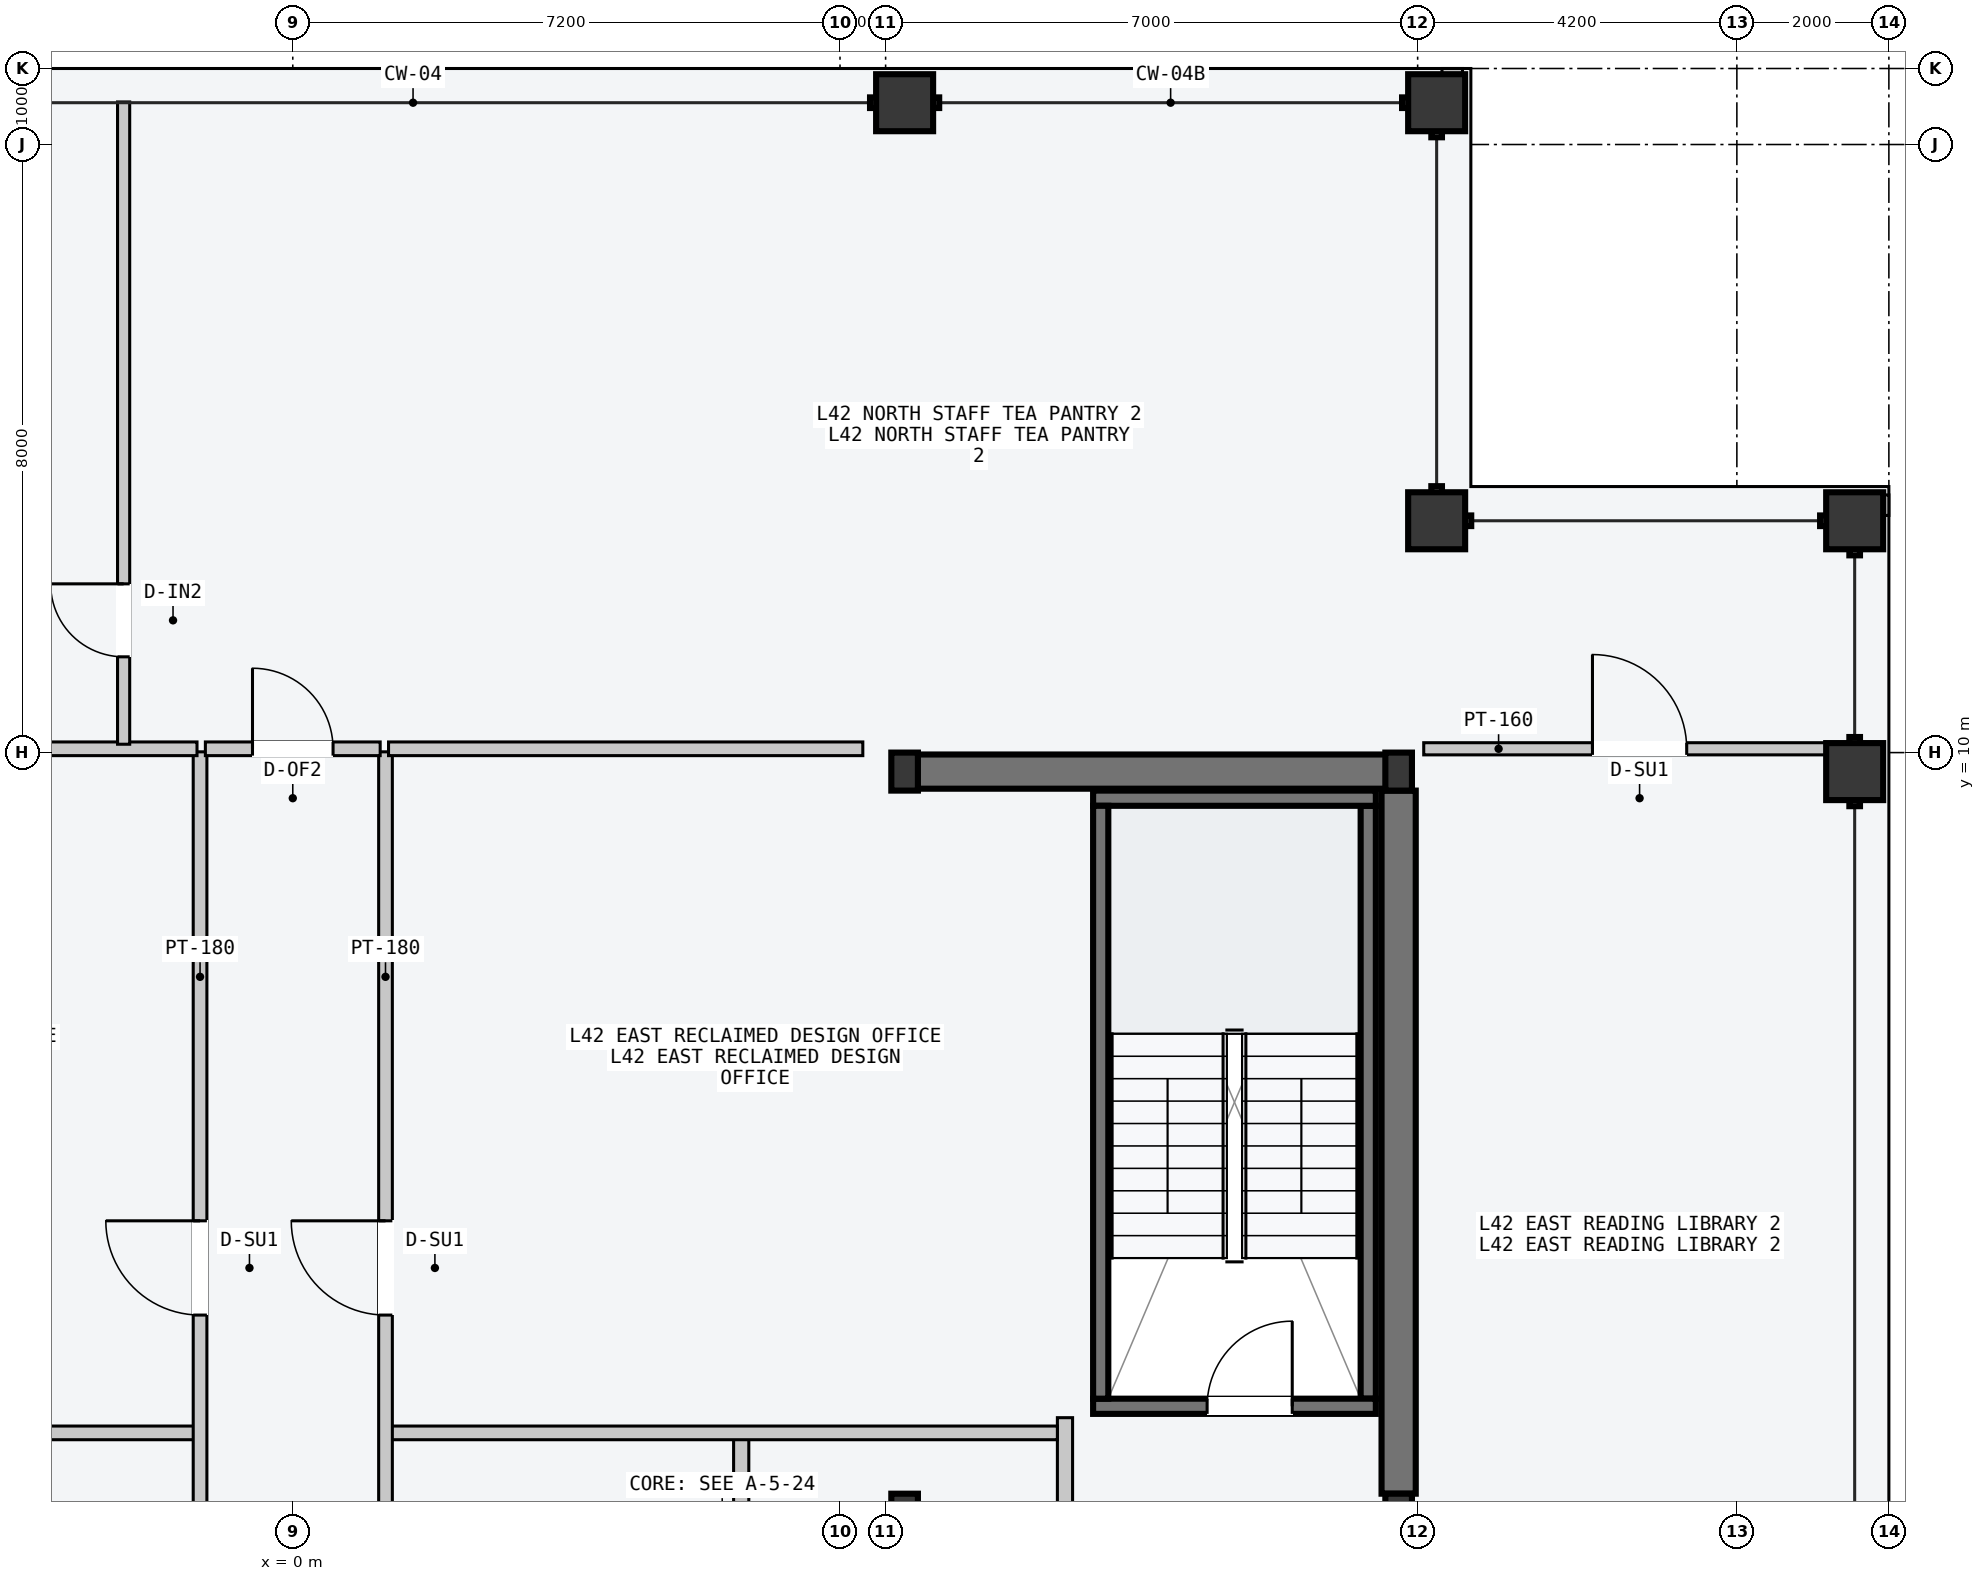
"""IFC4 building model, lengths in metres.
Left out: names, types, materials, properties, quantities, classifications, styles, units other than length and angle.
Written with IfcOpenShell. Run it as: python <this file> out.ifc"""

import sys

from ifc_helpers import new_model, si_unit, direction, frame, frame_2d, origin, origin_2d, place, context, subcontext, project, spatial, rectangle, hollow_rectangle, i_section, extrude, element, fill, save


model = new_model("IFC4")
c1 = context("Model", 3, precision=1e-05, world=origin(), true_north=direction((0.0, 1.0)))
c2 = subcontext(c1, "Body", "Model", "MODEL_VIEW")
j1 = project(units=[si_unit("LENGTHUNIT", "METRE"), si_unit("PLANEANGLEUNIT", "RADIAN")], contexts=[c1])
p1 = place(None, origin())
s1 = spatial("IfcSite", under=j1, at=p1, CompositionType="ELEMENT")
p2 = place(p1, origin())
s2 = spatial("IfcBuilding", under=s1, at=p2, CompositionType="ELEMENT")
p3 = place(p2, frame((0.0, 0.0, 162.3)))
s3 = spatial("IfcBuildingStorey", under=s2, at=p3, CompositionType="ELEMENT", Elevation=162.3)
p4 = place(p3, frame((8.07, 9.75, -0.2), z_axis=(0.0, 0.0, 1.0), x_axis=(1.0, 0.0, 0.0)))
e1 = element("IfcWall", 1, at=p4, inside=s3, PredefinedType="SHEAR", context=c2, shape_type="SweptSolid", body=[
    extrude(rectangle(XDim=6.46, YDim=0.45, at=frame_2d((3.23, 0.0))), origin(), (0.0, 0.0, 1.0), 3.6),
])
p5 = place(p3, frame((14.55, 0.25, -0.2), z_axis=(0.0, 0.0, 1.0), x_axis=(0.0, 1.0, 0.0)))
e2 = element("IfcWall", 2, at=p5, inside=s3, PredefinedType="SHEAR", context=c2, shape_type="SweptSolid", body=[
    extrude(rectangle(XDim=9.25, YDim=0.45, at=frame_2d((4.625, 0.0))), origin(), (0.0, 0.0, 1.0), 3.6),
])
p6 = place(p3, frame((14.15, 1.5, -0.2), z_axis=(0.0, 0.0, 1.0), x_axis=(0.0, 1.0, 0.0)))
e3 = element("IfcWall", 3, at=p6, inside=s3, PredefinedType="SOLIDWALL", context=c2, shape_type="SweptSolid", body=[
    extrude(rectangle(XDim=7.8, YDim=0.2, at=frame_2d((3.9, 0.0))), origin(), (0.0, 0.0, 1.0), 3.6),
])
p7 = place(p3, frame((10.53, 1.4, -0.2), z_axis=(0.0, 0.0, 1.0), x_axis=(1.0, 0.0, 0.0)))
e4 = element("IfcWall", 4, at=p7, inside=s3, PredefinedType="SOLIDWALL", context=c2, shape_type="SweptSolid", body=[
    extrude(rectangle(XDim=3.72, YDim=0.2, at=frame_2d((1.86, 0.0))), origin(), (0.0, 0.0, 1.0), 3.6),
])
p8 = place(p7, frame((1.5, 0.0, 0.2)))
e5 = element("IfcOpeningElement", 5, at=p8, cuts=e4, PredefinedType="OPENING", context=c2, shape_type="SweptSolid", body=[
    extrude(rectangle(XDim=1.12, YDim=2.18, at=frame_2d((0.56, 1.09))), frame((0.0, 0.11, 0.0), z_axis=(0.0, -1.0, 0.0), x_axis=(1.0, 0.0, 0.0)), (0.0, 0.0, 1.0), 0.22),
])
p9 = place(p3, frame((10.53, 9.4, -0.2), z_axis=(0.0, 0.0, 1.0), x_axis=(1.0, 0.0, 0.0)))
e6 = element("IfcWall", 6, at=p9, inside=s3, PredefinedType="SOLIDWALL", context=c2, shape_type="SweptSolid", body=[
    extrude(rectangle(XDim=3.72, YDim=0.2, at=frame_2d((1.86, 0.0))), origin(), (0.0, 0.0, 1.0), 3.6),
])
p10 = place(p3, frame((10.63, 1.5, -0.2), z_axis=(0.0, 0.0, 1.0), x_axis=(0.0, 1.0, 0.0)))
e7 = element("IfcWall", 7, at=p10, inside=s3, PredefinedType="SOLIDWALL", context=c2, shape_type="SweptSolid", body=[
    extrude(rectangle(XDim=7.8, YDim=0.2, at=frame_2d((3.9, 0.0))), origin(), (0.0, 0.0, 1.0), 3.6),
])
for number, where, z_axis, x_axis in (
    (8, (8.05, 0.0, 0.0), (0.0, 0.0, 1.0), (1.0, 0.0, 0.0)),
    (9, (8.05, 9.75, 0.0), (0.0, 0.0, 1.0), (1.0, 0.0, 0.0)),
    (10, (14.55, 0.0, 0.0), (0.0, 0.0, 1.0), (1.0, 0.0, 0.0)),
    (11, (14.55, 9.75, 0.0), (0.0, 0.0, 1.0), (1.0, 0.0, 0.0)),
):
    element("IfcColumn", number, at=place(p3, frame(where, z_axis=z_axis, x_axis=x_axis)), inside=s3, PredefinedType="COLUMN", context=c2, shape_type="SweptSolid", body=[
        extrude(i_section(OverallWidth=0.35, OverallDepth=0.5, WebThickness=0.02, FlangeThickness=0.032, at=origin_2d()), origin(), (0.0, 0.0, 1.0), 3.6),
    ])
for number, where, z_axis, x_axis in (
    (12, (8.05, 18.55, 0.0), (0.0, 0.0, 1.0), (1.0, 0.0, 0.0)),
    (13, (15.05, 18.55, 0.0), (0.0, 0.0, 1.0), (1.0, 0.0, 0.0)),
    (14, (20.55, 9.75, 0.0), (0.0, 0.0, 1.0), (0.0, 1.0, 0.0)),
    (15, (20.55, 13.05, 0.0), (0.0, 0.0, 1.0), (0.0, 1.0, 0.0)),
    (16, (15.05, 13.05, 0.0), (0.0, 0.0, 1.0), (1.0, 0.0, 0.0)),
):
    element("IfcColumn", number, at=place(p3, frame(where, z_axis=z_axis, x_axis=x_axis)), inside=s3, PredefinedType="COLUMN", context=c2, shape_type="SweptSolid", body=[
        extrude(hollow_rectangle(XDim=0.75, YDim=0.75, WallThickness=0.032, at=origin_2d()), origin(), (0.0, 0.0, 1.0), 3.6),
    ])
for number, where, z_axis, x_axis in (
    (17, (15.12, 18.89, 0.0), (0.0, 0.0, 1.0), (1.0, 0.0, 0.0)),
    (18, (20.89, 13.12, 0.0), (0.0, 0.0, 1.0), (0.0, 1.0, 0.0)),
):
    element("IfcWall", number, at=place(p3, frame(where, z_axis=z_axis, x_axis=x_axis)), inside=s3, PredefinedType="PARAPET", context=c2, shape_type="SweptSolid", body=[
        extrude(rectangle(XDim=0.27, YDim=0.22, at=frame_2d((0.135, 0.0))), origin(), (0.0, 0.0, 1.0), 1.2),
    ])
p11 = place(p3, frame((5.9, -9.45, 0.0), z_axis=(0.0, 0.0, 1.0), x_axis=(0.0, 1.0, 0.0)))
e19 = element("IfcWall", 19, at=p11, inside=s3, PredefinedType="PARTITIONING", context=c2, shape_type="SweptSolid", body=[
    extrude(rectangle(XDim=10.5, YDim=0.2, at=frame_2d((5.25, 0.0))), origin(), (0.0, 0.0, 1.0), 3.4),
])
p12 = place(p11, frame((3.9, 0.0, 0.0)))
e20 = element("IfcOpeningElement", 20, at=p12, cuts=e19, PredefinedType="OPENING", context=c2, shape_type="SweptSolid", body=[
    extrude(rectangle(XDim=1.5, YDim=2.2, at=frame_2d((0.75, 1.1))), frame((0.0, 0.11, 0.0), z_axis=(0.0, -1.0, 0.0), x_axis=(1.0, 0.0, 0.0)), (0.0, 0.0, 1.0), 0.22),
])
p13 = place(p3, frame((10.16, -2.55, 0.0), z_axis=(0.0, 0.0, 1.0), x_axis=(0.0, 1.0, 0.0)))
e21 = element("IfcWall", 21, at=p13, inside=s3, PredefinedType="PARTITIONING", context=c2, shape_type="SweptSolid", body=[
    extrude(rectangle(XDim=3.8, YDim=0.2, at=frame_2d((1.9, 0.0))), origin(), (0.0, 0.0, 1.0), 3.4),
])
p14 = place(p13, frame((1.3, 0.0, 0.0)))
e22 = element("IfcOpeningElement", 22, at=p14, cuts=e21, PredefinedType="OPENING", context=c2, shape_type="SweptSolid", body=[
    extrude(rectangle(XDim=1.1, YDim=2.15, at=frame_2d((0.55, 1.075))), frame((0.0, 0.11, 0.0), z_axis=(0.0, -1.0, 0.0), x_axis=(1.0, 0.0, 0.0)), (0.0, 0.0, 1.0), 0.22),
])
p15 = place(p3, frame((-10.05, 1.05, 0.0), z_axis=(0.0, 0.0, 1.0), x_axis=(1.0, 0.0, 0.0)))
e23 = element("IfcWall", 23, at=p15, inside=s3, PredefinedType="PARTITIONING", context=c2, shape_type="SweptSolid", body=[
    extrude(rectangle(XDim=8.79, YDim=0.18, at=frame_2d((4.395, 0.0))), origin(), (0.0, 0.0, 1.0), 3.4),
])
p16 = place(p3, frame((-1.22, -3.5, 0.0), z_axis=(0.0, 0.0, 1.0), x_axis=(0.0, 1.0, 0.0)))
e24 = element("IfcWall", 24, at=p16, inside=s3, PredefinedType="PARTITIONING", context=c2, shape_type="SweptSolid", body=[
    extrude(rectangle(XDim=13.51, YDim=0.18, at=frame_2d((6.755, 0.0))), origin(), (0.0, 0.0, 1.0), 3.4),
])
p17 = place(p16, frame((6.1, 0.0, 0.0)))
e25 = element("IfcOpeningElement", 25, at=p17, cuts=e24, PredefinedType="OPENING", context=c2, shape_type="SweptSolid", body=[
    extrude(rectangle(XDim=1.24, YDim=2.24, at=frame_2d((0.62, 1.12))), frame((0.0, 0.1, 0.0), z_axis=(0.0, -1.0, 0.0), x_axis=(1.0, 0.0, 0.0)), (0.0, 0.0, 1.0), 0.2),
])
p18 = place(p16, frame((1.6, 0.0, 0.0)))
e26 = element("IfcOpeningElement", 26, at=p18, cuts=e24, PredefinedType="OPENING", context=c2, shape_type="SweptSolid", body=[
    extrude(rectangle(XDim=0.96, YDim=2.18, at=frame_2d((0.48, 1.09))), frame((0.0, 0.1, 0.0), z_axis=(0.0, -1.0, 0.0), x_axis=(1.0, 0.0, 0.0)), (0.0, 0.0, 1.0), 0.2),
])
p19 = place(p3, frame((-7.5, 10.05, 0.0), z_axis=(0.0, 0.0, 1.0), x_axis=(1.0, 0.0, 0.0)))
e27 = element("IfcWall", 27, at=p19, inside=s3, PredefinedType="PARTITIONING", context=c2, shape_type="SweptSolid", body=[
    extrude(rectangle(XDim=6.24, YDim=0.18, at=frame_2d((3.12, 0.0))), origin(), (0.0, 0.0, 1.0), 3.4),
])
p20 = place(p3, frame((1.26, 1.05, 0.0), z_axis=(0.0, 0.0, 1.0), x_axis=(1.0, 0.0, 0.0)))
e28 = element("IfcWall", 28, at=p20, inside=s3, PredefinedType="PARTITIONING", context=c2, shape_type="SweptSolid", body=[
    extrude(rectangle(XDim=8.8, YDim=0.18, at=frame_2d((4.4, 0.0))), origin(), (0.0, 0.0, 1.0), 3.4),
])
p21 = place(p3, frame((1.22, -3.5, 0.0), z_axis=(0.0, 0.0, 1.0), x_axis=(0.0, 1.0, 0.0)))
e29 = element("IfcWall", 29, at=p21, inside=s3, PredefinedType="PARTITIONING", context=c2, shape_type="SweptSolid", body=[
    extrude(rectangle(XDim=13.51, YDim=0.18, at=frame_2d((6.755, 0.0))), origin(), (0.0, 0.0, 1.0), 3.4),
])
p22 = place(p21, frame((6.1, 0.0, 0.0)))
e30 = element("IfcOpeningElement", 30, at=p22, cuts=e29, PredefinedType="OPENING", context=c2, shape_type="SweptSolid", body=[
    extrude(rectangle(XDim=1.24, YDim=2.24, at=frame_2d((0.62, 1.12))), frame((0.0, 0.1, 0.0), z_axis=(0.0, -1.0, 0.0), x_axis=(1.0, 0.0, 0.0)), (0.0, 0.0, 1.0), 0.2),
])
p23 = place(p21, frame((1.6, 0.0, 0.0)))
e31 = element("IfcOpeningElement", 31, at=p23, cuts=e29, PredefinedType="OPENING", context=c2, shape_type="SweptSolid", body=[
    extrude(rectangle(XDim=0.96, YDim=2.18, at=frame_2d((0.48, 1.09))), frame((0.0, 0.1, 0.0), z_axis=(0.0, -1.0, 0.0), x_axis=(1.0, 0.0, 0.0)), (0.0, 0.0, 1.0), 0.2),
])
p24 = place(p3, frame((1.26, 10.05, 0.0), z_axis=(0.0, 0.0, 1.0), x_axis=(1.0, 0.0, 0.0)))
e32 = element("IfcWall", 32, at=p24, inside=s3, PredefinedType="PARTITIONING", context=c2, shape_type="SweptSolid", body=[
    extrude(rectangle(XDim=6.24, YDim=0.18, at=frame_2d((3.12, 0.0))), origin(), (0.0, 0.0, 1.0), 3.4),
])
p25 = place(p3, frame((-2.226, 10.11, 0.0), z_axis=(0.0, 0.0, 1.0), x_axis=(0.0, 1.0, 0.0)))
e33 = element("IfcWall", 33, at=p25, inside=s3, PredefinedType="PARTITIONING", context=c2, shape_type="SweptSolid", body=[
    extrude(rectangle(XDim=8.45, YDim=0.16, at=frame_2d((4.225, 0.0))), origin(), (0.0, 0.0, 1.0), 3.4),
])
p26 = place(p25, frame((1.15, 0.0, 0.0)))
e34 = element("IfcOpeningElement", 34, at=p26, cuts=e33, PredefinedType="OPENING", context=c2, shape_type="SweptSolid", body=[
    extrude(rectangle(XDim=0.96, YDim=2.18, at=frame_2d((0.48, 1.09))), frame((0.0, 0.09, 0.0), z_axis=(0.0, -1.0, 0.0), x_axis=(1.0, 0.0, 0.0)), (0.0, 0.0, 1.0), 0.18),
])
p27 = place(p3, frame((-1.15, 10.05, 0.0), z_axis=(0.0, 0.0, 1.0), x_axis=(1.0, 0.0, 0.0)))
e35 = element("IfcWall", 35, at=p27, inside=s3, PredefinedType="PARTITIONING", context=c2, shape_type="SweptSolid", body=[
    extrude(rectangle(XDim=2.3, YDim=0.18, at=frame_2d((1.15, 0.0))), origin(), (0.0, 0.0, 1.0), 3.4),
])
p28 = place(p27, frame((0.62, 0.0, 0.0)))
e36 = element("IfcOpeningElement", 36, at=p28, cuts=e35, PredefinedType="OPENING", context=c2, shape_type="SweptSolid", body=[
    extrude(rectangle(XDim=1.06, YDim=2.2, at=frame_2d((0.53, 1.1))), frame((0.0, 0.1, 0.0), z_axis=(0.0, -1.0, 0.0), x_axis=(1.0, 0.0, 0.0)), (0.0, 0.0, 1.0), 0.2),
])
p29 = place(p3, frame((14.88, 10.05, 0.0), z_axis=(0.0, 0.0, 1.0), x_axis=(1.0, 0.0, 0.0)))
e37 = element("IfcWall", 37, at=p29, inside=s3, PredefinedType="PARTITIONING", context=c2, shape_type="SweptSolid", body=[
    extrude(rectangle(XDim=5.68, YDim=0.16, at=frame_2d((2.84, 0.0))), origin(), (0.0, 0.0, 1.0), 3.4),
])
p30 = place(p29, frame((2.22, 0.0, 0.0)))
e38 = element("IfcOpeningElement", 38, at=p30, cuts=e37, PredefinedType="OPENING", context=c2, shape_type="SweptSolid", body=[
    extrude(rectangle(XDim=1.24, YDim=2.24, at=frame_2d((0.62, 1.12))), frame((0.0, 0.09, 0.0), z_axis=(0.0, -1.0, 0.0), x_axis=(1.0, 0.0, 0.0)), (0.0, 0.0, 1.0), 0.18),
])
p31 = place(p8, origin())
e39 = element("IfcDoor", 39, at=p31, inside=s3, OperationType="SINGLE_SWING_RIGHT", PredefinedType="DOOR", context=c2, shape_type="SweptSolid", body=[
    extrude(rectangle(XDim=1.12, YDim=2.18, at=frame_2d((0.56, 1.09))), frame((0.0, 0.025, 0.0), z_axis=(0.0, -1.0, 0.0), x_axis=(1.0, 0.0, 0.0)), (0.0, 0.0, 1.0), 0.05),
])
fill(e5, e39)
p32 = place(p17, origin())
e40 = element("IfcDoor", 40, at=p32, inside=s3, OperationType="SINGLE_SWING_RIGHT", PredefinedType="DOOR", context=c2, shape_type="SweptSolid", body=[
    extrude(rectangle(XDim=1.24, YDim=2.24, at=frame_2d((0.62, 1.12))), frame((0.0, 0.025, 0.0), z_axis=(0.0, -1.0, 0.0), x_axis=(1.0, 0.0, 0.0)), (0.0, 0.0, 1.0), 0.05),
])
fill(e25, e40)
p33 = place(p22, origin())
e41 = element("IfcDoor", 41, at=p33, inside=s3, OperationType="SINGLE_SWING_RIGHT", PredefinedType="DOOR", context=c2, shape_type="SweptSolid", body=[
    extrude(rectangle(XDim=1.24, YDim=2.24, at=frame_2d((0.62, 1.12))), frame((0.0, 0.025, 0.0), z_axis=(0.0, -1.0, 0.0), x_axis=(1.0, 0.0, 0.0)), (0.0, 0.0, 1.0), 0.05),
])
fill(e30, e41)
p34 = place(p26, origin())
e42 = element("IfcDoor", 42, at=p34, inside=s3, OperationType="SINGLE_SWING_RIGHT", PredefinedType="DOOR", context=c2, shape_type="SweptSolid", body=[
    extrude(rectangle(XDim=0.96, YDim=2.18, at=frame_2d((0.48, 1.09))), frame((0.0, 0.025, 0.0), z_axis=(0.0, -1.0, 0.0), x_axis=(1.0, 0.0, 0.0)), (0.0, 0.0, 1.0), 0.05),
])
fill(e34, e42)
p35 = place(p28, origin())
e43 = element("IfcDoor", 43, at=p35, inside=s3, OperationType="SINGLE_SWING_LEFT", PredefinedType="DOOR", context=c2, shape_type="SweptSolid", body=[
    extrude(rectangle(XDim=1.06, YDim=2.2, at=frame_2d((0.53, 1.1))), frame((0.0, 0.025, 0.0), z_axis=(0.0, -1.0, 0.0), x_axis=(1.0, 0.0, 0.0)), (0.0, 0.0, 1.0), 0.05),
])
fill(e36, e43)
p36 = place(p30, origin())
e44 = element("IfcDoor", 44, at=p36, inside=s3, OperationType="SINGLE_SWING_LEFT", PredefinedType="DOOR", context=c2, shape_type="SweptSolid", body=[
    extrude(rectangle(XDim=1.24, YDim=2.24, at=frame_2d((0.62, 1.12))), frame((0.0, 0.025, 0.0), z_axis=(0.0, -1.0, 0.0), x_axis=(1.0, 0.0, 0.0)), (0.0, 0.0, 1.0), 0.05),
])
fill(e38, e44)
save(model, sys.argv[1])
